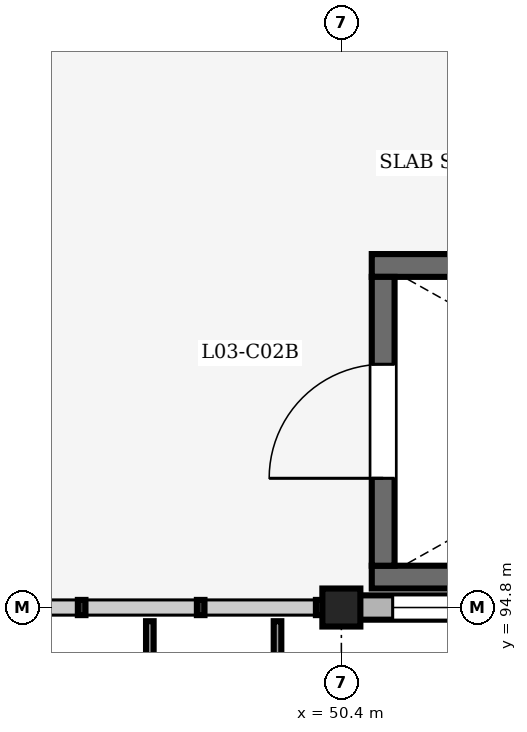
"""IFC4 building model, lengths in metres.
Left out: names, types, materials, properties, quantities, classifications, styles, units other than length and angle.
Written with IfcOpenShell. Run it as: python <this file> out.ifc"""

import sys

from ifc_helpers import new_model, si_unit, direction, frame, frame_2d, origin, origin_2d, place, context, subcontext, project, spatial, rectangle, extrude, element, fill, save


model = new_model("IFC4")
c1 = context("Model", 3, precision=1e-05, world=origin(), true_north=direction((0.0, 1.0)))
c2 = subcontext(c1, "Body", "Model", "MODEL_VIEW")
j1 = project(units=[si_unit("LENGTHUNIT", "METRE"), si_unit("PLANEANGLEUNIT", "RADIAN")], contexts=[c1])
p1 = place(None, origin())
s1 = spatial("IfcSite", under=j1, at=p1, CompositionType="ELEMENT")
p2 = place(p1, origin())
s2 = spatial("IfcBuilding", under=s1, at=p2, CompositionType="ELEMENT")
p3 = place(p2, frame((0.0, 0.0, 13.2)))
s3 = spatial("IfcBuildingStorey", under=s2, at=p3, CompositionType="ELEMENT", Elevation=13.2)
p4 = place(p3, frame((50.4, 94.8, 0.0), z_axis=(0.0, 0.0, 1.0), x_axis=(1.0, 0.0, 0.0)))
e1 = element("IfcColumn", 1, at=p4, inside=s3, PredefinedType="COLUMN", context=c2, shape_type="SweptSolid", body=[
    extrude(rectangle(XDim=0.5, YDim=0.5, at=origin_2d()), origin(), (0.0, 0.0, 1.0), 4.2),
])
p5 = place(p3, frame((50.625, 94.8, 0.0), z_axis=(0.0, 0.0, 1.0), x_axis=(1.0, 0.0, 0.0)))
e2 = element("IfcWall", 2, at=p5, inside=s3, PredefinedType="SOLIDWALL", context=c2, shape_type="SweptSolid", body=[
    extrude(rectangle(XDim=7.95, YDim=0.32, at=frame_2d((3.975, 0.0))), origin(), (0.0, 0.0, 1.0), 3.06),
])
p6 = place(p5, frame((0.45, 0.0, 0.9)))
e3 = element("IfcOpeningElement", 3, at=p6, cuts=e2, PredefinedType="OPENING", context=c2, shape_type="SweptSolid", body=[
    extrude(rectangle(XDim=1.2, YDim=1.8, at=frame_2d((0.6, 0.9))), frame((0.0, 0.17, 0.0), z_axis=(0.0, -1.0, 0.0), x_axis=(1.0, 0.0, 0.0)), (0.0, 0.0, 1.0), 0.34),
])
p7 = place(p5, frame((6.02, 0.0, 0.9)))
e4 = element("IfcOpeningElement", 4, at=p7, cuts=e2, PredefinedType="OPENING", context=c2, shape_type="SweptSolid", body=[
    extrude(rectangle(XDim=1.68, YDim=2.01, at=frame_2d((0.84, 1.005))), frame((0.0, 0.17, 0.0), z_axis=(0.0, -1.0, 0.0), x_axis=(1.0, 0.0, 0.0)), (0.0, 0.0, 1.0), 0.34),
])
for number, where, z_axis, x_axis in (
    (5, (50.8, 95.2, 0.0), (0.0, 0.0, 1.0), (1.0, 0.0, 0.0)),
    (6, (50.8, 99.3, 0.0), (0.0, 0.0, 1.0), (1.0, 0.0, 0.0)),
):
    element("IfcWall", number, at=place(p3, frame(where, z_axis=z_axis, x_axis=x_axis)), inside=s3, PredefinedType="SHEAR", context=c2, shape_type="SweptSolid", body=[
        extrude(rectangle(XDim=7.6, YDim=0.3, at=frame_2d((3.8, 0.0))), origin(), (0.0, 0.0, 1.0), 4.025),
    ])
p8 = place(p3, frame((50.95, 95.35, 0.0), z_axis=(0.0, 0.0, 1.0), x_axis=(0.0, 1.0, 0.0)))
e7 = element("IfcWall", 7, at=p8, inside=s3, PredefinedType="SHEAR", context=c2, shape_type="SweptSolid", body=[
    extrude(rectangle(XDim=3.8, YDim=0.3, at=frame_2d((1.9, 0.0))), origin(), (0.0, 0.0, 1.0), 4.025),
])
p9 = place(p8, frame((1.15, 0.0, 0.0)))
e8 = element("IfcOpeningElement", 8, at=p9, cuts=e7, PredefinedType="OPENING", context=c2, shape_type="SweptSolid", body=[
    extrude(rectangle(XDim=1.5, YDim=2.2, at=frame_2d((0.75, 1.1))), frame((0.0, 0.16, 0.0), z_axis=(0.0, -1.0, 0.0), x_axis=(1.0, 0.0, 0.0)), (0.0, 0.0, 1.0), 0.32),
])
p10 = place(p6, origin())
e9 = element("IfcWindow", 9, at=p10, inside=s3, PartitioningType="SINGLE_PANEL", PredefinedType="WINDOW", context=c2, shape_type="SweptSolid", body=[
    extrude(rectangle(XDim=1.2, YDim=1.8, at=frame_2d((0.6, 0.9))), frame((0.0, 0.03, 0.0), z_axis=(0.0, -1.0, 0.0), x_axis=(1.0, 0.0, 0.0)), (0.0, 0.0, 1.0), 0.06),
])
fill(e3, e9)
p11 = place(p9, origin())
e10 = element("IfcDoor", 10, at=p11, inside=s3, OperationType="DOUBLE_DOOR_SINGLE_SWING", PredefinedType="DOOR", context=c2, shape_type="SweptSolid", body=[
    extrude(rectangle(XDim=1.5, YDim=2.2, at=frame_2d((0.75, 1.1))), frame((0.0, 0.025, 0.0), z_axis=(0.0, -1.0, 0.0), x_axis=(1.0, 0.0, 0.0)), (0.0, 0.0, 1.0), 0.05),
])
fill(e8, e10)
save(model, sys.argv[1])
